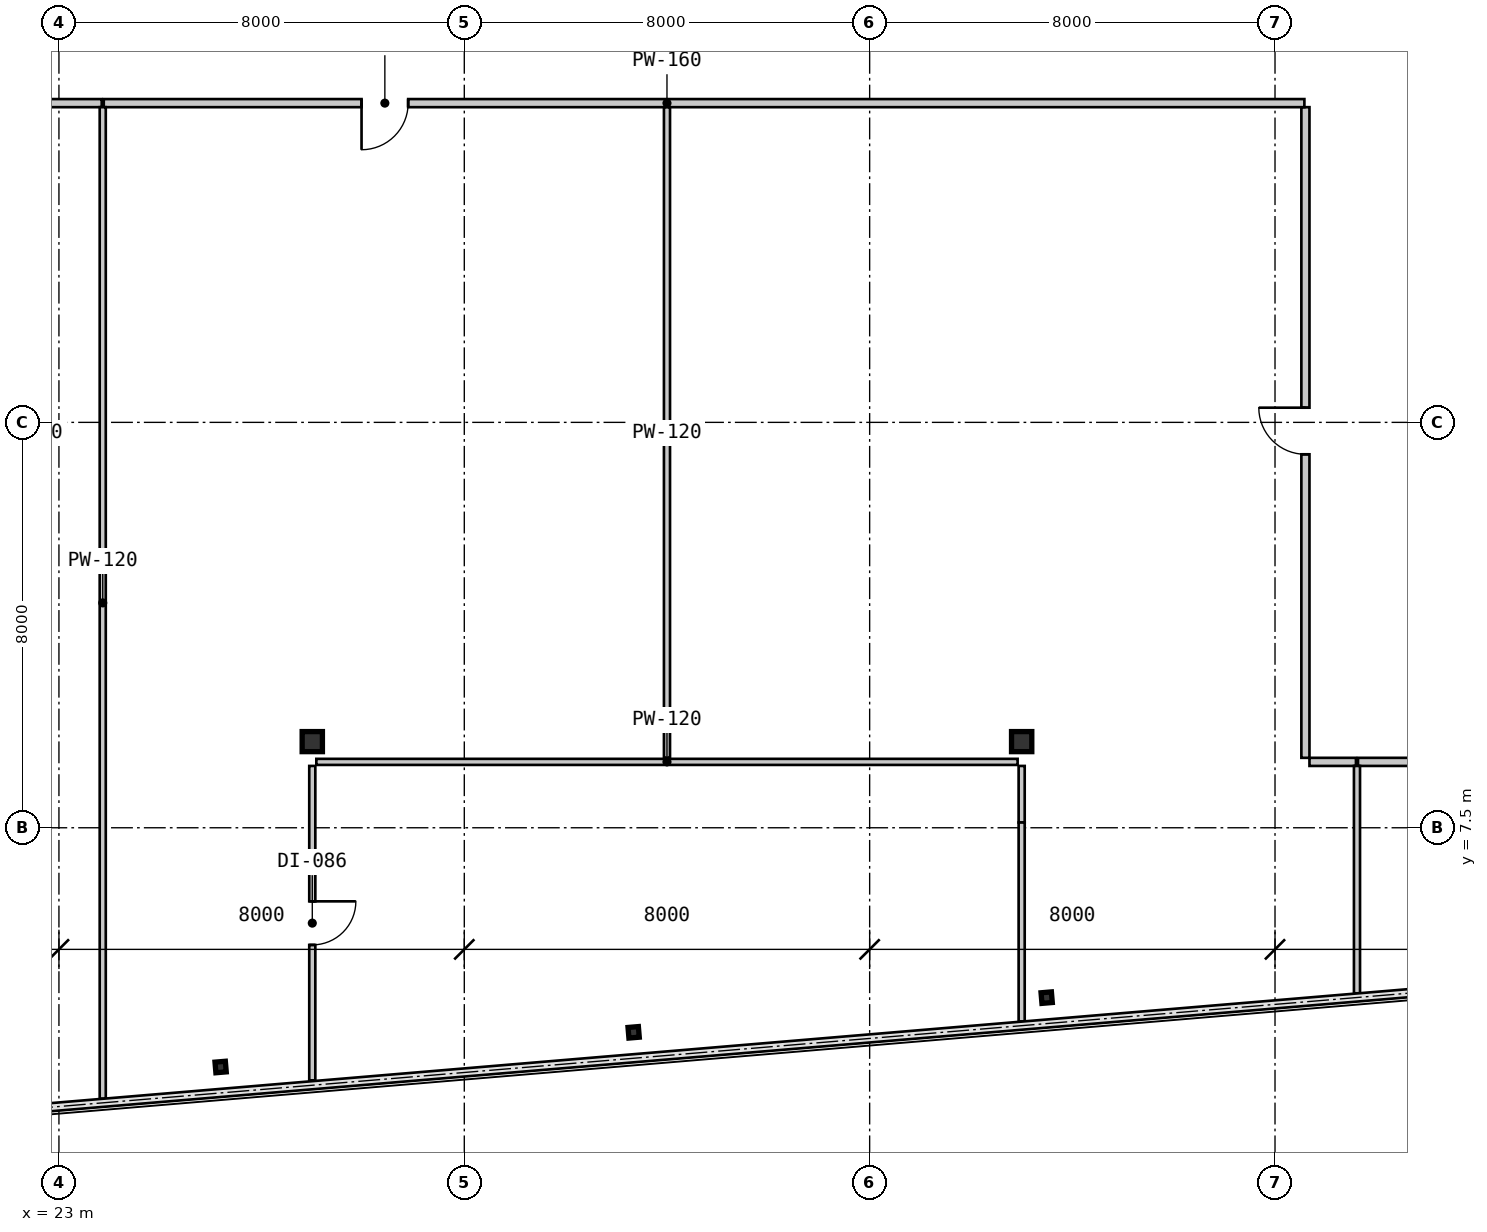
"""IFC4 building model, lengths in metres.
Left out: names, types, materials, properties, quantities, classifications, styles, units other than length and angle.
Written with IfcOpenShell. Run it as: python <this file> out.ifc"""

import sys

from ifc_helpers import new_model, si_unit, direction, frame, frame_2d, origin, origin_2d, place, context, subcontext, project, spatial, rectangle, i_section, extrude, source, transform, mapped, element, fill, save


model = new_model("IFC4")
c1 = context("Model", 3, precision=1e-05, world=origin(), true_north=direction((0.0, 1.0)))
c2 = subcontext(c1, "Body", "Model", "MODEL_VIEW")
j1 = project(units=[si_unit("LENGTHUNIT", "METRE"), si_unit("PLANEANGLEUNIT", "RADIAN")], contexts=[c1])
p1 = place(None, origin())
s1 = spatial("IfcSite", under=j1, at=p1, CompositionType="ELEMENT")
p2 = place(p1, origin())
s2 = spatial("IfcBuilding", under=s1, at=p2, CompositionType="ELEMENT")
p3 = place(p2, frame((0.0, 0.0, 197.75)))
s3 = spatial("IfcBuildingStorey", under=s2, at=p3, CompositionType="ELEMENT", Elevation=197.75)
m1 = source(origin(), c2, "Body", "SweptSolid", [
    extrude(i_section(OverallWidth=0.4, OverallDepth=0.396, WebThickness=0.022, FlangeThickness=0.034, at=origin_2d()), origin(), (0.0, 0.0, 1.0), 3.15),
])
for number, where, z_axis, x_axis in (
    (1, (28.0, 9.2, 0.0), (0.0, 0.0, 1.0), (1.0, 0.0, 0.0)),
    (2, (42.0, 9.2, 0.0), (0.0, 0.0, 1.0), (1.0, 0.0, 0.0)),
):
    element("IfcColumn", number, at=place(p3, frame(where, z_axis=z_axis, x_axis=x_axis)), inside=s3, PredefinedType="COLUMN", context=c2, shape_type="MappedRepresentation", body=[
        mapped(m1, transform((0.0, 0.0, 0.0), scale=1.0)),
    ])
m2 = source(origin(), c2, "Body", "SweptSolid", [
    extrude(i_section(OverallWidth=0.205, OverallDepth=0.21, WebThickness=0.009, FlangeThickness=0.014, at=origin_2d()), origin(), (0.0, 0.0, 1.0), 3.15),
])
for number, where, z_axis, x_axis in (
    (3, (26.191, 2.779, 0.0), (0.0, 0.0, 1.0), (0.996, 0.084, 0.0)),
    (4, (34.342, 3.463, 0.0), (0.0, 0.0, 1.0), (0.996, 0.084, 0.0)),
    (5, (42.494, 4.147, 0.0), (0.0, 0.0, 1.0), (0.996, 0.084, 0.0)),
):
    element("IfcColumn", number, at=place(p3, frame(where, z_axis=z_axis, x_axis=x_axis)), inside=s3, PredefinedType="COLUMN", context=c2, shape_type="MappedRepresentation", body=[
        mapped(m2, transform((0.0, 0.0, 0.0), scale=1.0)),
    ])
m3 = source(origin(), c2, "Body", "SweptSolid", [
    extrude(rectangle(XDim=1.424, YDim=0.16, at=frame_2d((0.712, 0.0))), origin(), (0.0, 0.0, 1.0), 2.93),
])
p4 = place(p3, frame((23.844, 21.8, 0.0), z_axis=(0.0, 0.0, 1.0), x_axis=(-1.0, 0.0, 0.0)))
e6 = element("IfcWall", 6, at=p4, inside=s3, PredefinedType="PARTITIONING", context=c2, shape_type="MappedRepresentation", body=[
    mapped(m3, transform((0.0, 0.0, 0.0), scale=1.0)),
])
m4 = source(origin(), c2, "Body", "SweptSolid", [
    extrude(rectangle(XDim=11.095, YDim=0.16, at=frame_2d((5.547, 0.0))), origin(), (0.0, 0.0, 1.0), 2.93),
])
p5 = place(p3, frame((34.98, 21.8, 0.0), z_axis=(0.0, 0.0, 1.0), x_axis=(-1.0, 0.0, 0.0)))
e7 = element("IfcWall", 7, at=p5, inside=s3, PredefinedType="PARTITIONING", context=c2, shape_type="MappedRepresentation", body=[
    mapped(m4, transform((0.0, 0.0, 0.0), scale=1.0)),
])
m5 = source(origin(), c2, "Body", "SweptSolid", [
    extrude(rectangle(XDim=0.92, YDim=2.1, at=frame_2d((0.46, 1.05))), frame((0.0, 0.09, 0.0), z_axis=(0.0, -1.0, 0.0), x_axis=(1.0, 0.0, 0.0)), (0.0, 0.0, 1.0), 0.18),
])
p6 = place(p5, frame((5.087, 0.0, 0.0)))
e8 = element("IfcOpeningElement", 8, at=p6, cuts=e7, PredefinedType="OPENING", context=c2, shape_type="MappedRepresentation", body=[
    mapped(m5, transform((0.0, 0.0, 0.0), scale=1.0)),
])
m6 = source(origin(), c2, "Body", "SweptSolid", [
    extrude(rectangle(XDim=12.84, YDim=0.16, at=frame_2d((6.42, 0.0))), origin(), (0.0, 0.0, 1.0), 2.93),
])
p7 = place(p3, frame((47.6, 8.88, 0.0), z_axis=(0.0, 0.0, 1.0), x_axis=(0.0, 1.0, 0.0)))
e9 = element("IfcWall", 9, at=p7, inside=s3, PredefinedType="PARTITIONING", context=c2, shape_type="MappedRepresentation", body=[
    mapped(m6, transform((0.0, 0.0, 0.0), scale=1.0)),
])
p8 = place(p7, frame((5.99, 0.0, 0.0)))
e10 = element("IfcOpeningElement", 10, at=p8, cuts=e9, PredefinedType="OPENING", context=c2, shape_type="MappedRepresentation", body=[
    mapped(m5, transform((0.0, 0.0, 0.0), scale=1.0)),
])
m7 = source(origin(), c2, "Body", "SweptSolid", [
    extrude(rectangle(XDim=12.559, YDim=0.16, at=frame_2d((6.28, 0.0))), origin(), (0.0, 0.0, 1.0), 2.93),
])
p9 = place(p3, frame((47.58, 21.8, 0.0), z_axis=(0.0, 0.0, 1.0), x_axis=(-1.0, 0.0, 0.0)))
e11 = element("IfcWall", 11, at=p9, inside=s3, PredefinedType="PARTITIONING", context=c2, shape_type="MappedRepresentation", body=[
    mapped(m7, transform((0.0, 0.0, 0.0), scale=1.0)),
])
m8 = source(origin(), c2, "Body", "SweptSolid", [
    extrude(rectangle(XDim=0.917, YDim=0.16, at=frame_2d((0.459, 0.0))), origin(), (0.0, 0.0, 1.0), 2.93),
])
p10 = place(p3, frame((48.597, 8.8, 0.0), z_axis=(0.0, 0.0, 1.0), x_axis=(-1.0, 0.0, 0.0)))
e12 = element("IfcWall", 12, at=p10, inside=s3, PredefinedType="PARTITIONING", context=c2, shape_type="MappedRepresentation", body=[
    mapped(m8, transform((0.0, 0.0, 0.0), scale=1.0)),
])
m9 = source(origin(), c2, "Body", "SweptSolid", [
    extrude(rectangle(XDim=1.082, YDim=0.16, at=frame_2d((0.541, 0.0))), origin(), (0.0, 0.0, 1.0), 2.93),
])
p11 = place(p3, frame((49.72, 8.8, 0.0), z_axis=(0.0, 0.0, 1.0), x_axis=(-1.0, 0.0, 0.0)))
e13 = element("IfcWall", 13, at=p11, inside=s3, PredefinedType="PARTITIONING", context=c2, shape_type="MappedRepresentation", body=[
    mapped(m9, transform((0.0, 0.0, 0.0), scale=1.0)),
])
m10 = source(origin(), c2, "Body", "SweptSolid", [
    extrude(rectangle(XDim=6.9, YDim=0.12, at=frame_2d((3.45, 0.0))), origin(), (0.0, 0.0, 1.0), 2.93),
])
p12 = place(p3, frame((28.08, 8.8, 0.0), z_axis=(0.0, 0.0, 1.0), x_axis=(1.0, 0.0, 0.0)))
e14 = element("IfcWall", 14, at=p12, inside=s3, PredefinedType="PARTITIONING", context=c2, shape_type="MappedRepresentation", body=[
    mapped(m10, transform((0.0, 0.0, 0.0), scale=1.0)),
])
m11 = source(origin(), c2, "Body", "SweptSolid", [
    extrude(rectangle(XDim=6.204, YDim=0.12, at=frame_2d((3.102, 0.0))), origin(), (0.0, 0.0, 1.0), 2.93),
])
p13 = place(p3, frame((28.0, 2.516, 0.0), z_axis=(0.0, 0.0, 1.0), x_axis=(0.0, 1.0, 0.0)))
e15 = element("IfcWall", 15, at=p13, inside=s3, PredefinedType="PARTITIONING", context=c2, shape_type="MappedRepresentation", body=[
    mapped(m11, transform((0.0, 0.0, 0.0), scale=1.0)),
])
m12 = source(origin(), c2, "Body", "SweptSolid", [
    extrude(rectangle(XDim=0.86, YDim=2.1, at=frame_2d((0.43, 1.05))), frame((0.0, 0.07, 0.0), z_axis=(0.0, -1.0, 0.0), x_axis=(1.0, 0.0, 0.0)), (0.0, 0.0, 1.0), 0.14),
])
p14 = place(p13, frame((2.672, 0.0, 0.0)))
e16 = element("IfcOpeningElement", 16, at=p14, cuts=e15, PredefinedType="OPENING", context=c2, shape_type="MappedRepresentation", body=[
    mapped(m12, transform((0.0, 0.0, 0.0), scale=1.0)),
])
p15 = place(p3, frame((35.02, 8.8, 0.0), z_axis=(0.0, 0.0, 1.0), x_axis=(1.0, 0.0, 0.0)))
e17 = element("IfcWall", 17, at=p15, inside=s3, PredefinedType="PARTITIONING", context=c2, shape_type="MappedRepresentation", body=[
    mapped(m10, transform((0.0, 0.0, 0.0), scale=1.0)),
])
m13 = source(origin(), c2, "Body", "SweptSolid", [
    extrude(rectangle(XDim=1.116, YDim=0.12, at=frame_2d((0.558, 0.0))), origin(), (0.0, 0.0, 1.0), 2.47),
])
p16 = place(p3, frame((42.0, 8.72, 0.0), z_axis=(0.0, 0.0, 1.0), x_axis=(0.0, -1.0, 0.0)))
e18 = element("IfcWall", 18, at=p16, inside=s3, PredefinedType="PARTITIONING", context=c2, shape_type="MappedRepresentation", body=[
    mapped(m13, transform((0.0, 0.0, 0.0), scale=1.0)),
])
m14 = source(origin(), c2, "Body", "SweptSolid", [
    extrude(rectangle(XDim=3.926, YDim=0.12, at=frame_2d((1.963, 0.0))), origin(), (0.0, 0.0, 1.0), 2.93),
])
p17 = place(p3, frame((42.0, 7.604, 0.0), z_axis=(0.0, 0.0, 1.0), x_axis=(0.0, -1.0, 0.0)))
e19 = element("IfcWall", 19, at=p17, inside=s3, PredefinedType="PARTITIONING", context=c2, shape_type="MappedRepresentation", body=[
    mapped(m14, transform((0.0, 0.0, 0.0), scale=1.0)),
])
m15 = source(origin(), c2, "Body", "SweptSolid", [
    extrude(rectangle(XDim=19.565, YDim=0.12, at=frame_2d((9.782, 0.0))), origin(), (0.0, 0.0, 1.0), 2.93),
])
p18 = place(p3, frame((23.865, 21.72, 0.0), z_axis=(0.0, 0.0, 1.0), x_axis=(0.0, -1.0, 0.0)))
e20 = element("IfcWall", 20, at=p18, inside=s3, PredefinedType="PARTITIONING", context=c2, shape_type="MappedRepresentation", body=[
    mapped(m15, transform((0.0, 0.0, 0.0), scale=1.0)),
])
m16 = source(origin(), c2, "Body", "SweptSolid", [
    extrude(rectangle(XDim=12.836, YDim=0.12, at=frame_2d((6.418, 0.0))), origin(), (0.0, 0.0, 1.0), 2.93),
])
p19 = place(p3, frame((35.0, 21.718, 0.0), z_axis=(0.0, 0.0, 1.0), x_axis=(0.0, -1.0, 0.0)))
e21 = element("IfcWall", 21, at=p19, inside=s3, PredefinedType="PARTITIONING", context=c2, shape_type="MappedRepresentation", body=[
    mapped(m16, transform((0.0, 0.0, 0.0), scale=1.0)),
])
m17 = source(origin(), c2, "Body", "SweptSolid", [
    extrude(rectangle(XDim=4.487, YDim=0.12, at=frame_2d((2.243, 0.0))), origin(), (0.0, 0.0, 1.0), 2.93),
])
p20 = place(p3, frame((48.618, 8.72, 0.0), z_axis=(0.0, 0.0, 1.0), x_axis=(0.0, -1.0, 0.0)))
e22 = element("IfcWall", 22, at=p20, inside=s3, PredefinedType="PARTITIONING", context=c2, shape_type="MappedRepresentation", body=[
    mapped(m17, transform((0.0, 0.0, 0.0), scale=1.0)),
])
m18 = source(origin(), c2, "Body", "SweptSolid", [
    extrude(rectangle(XDim=0.92, YDim=2.1, at=frame_2d((0.46, 1.05))), frame((0.0, 0.025, 0.0), z_axis=(0.0, -1.0, 0.0), x_axis=(1.0, 0.0, 0.0)), (0.0, 0.0, 1.0), 0.05),
])
p21 = place(p6, origin())
e23 = element("IfcDoor", 23, at=p21, inside=s3, OperationType="SINGLE_SWING_RIGHT", PredefinedType="DOOR", context=c2, shape_type="MappedRepresentation", body=[
    mapped(m18, transform((0.0, 0.0, 0.0), scale=1.0)),
])
fill(e8, e23)
p22 = place(p8, origin())
e24 = element("IfcDoor", 24, at=p22, inside=s3, OperationType="SINGLE_SWING_RIGHT", PredefinedType="DOOR", context=c2, shape_type="MappedRepresentation", body=[
    mapped(m18, transform((0.0, 0.0, 0.0), scale=1.0)),
])
fill(e10, e24)
m19 = source(origin(), c2, "Body", "SweptSolid", [
    extrude(rectangle(XDim=0.86, YDim=2.1, at=frame_2d((0.43, 1.05))), frame((0.0, 0.025, 0.0), z_axis=(0.0, -1.0, 0.0), x_axis=(1.0, 0.0, 0.0)), (0.0, 0.0, 1.0), 0.05),
])
p23 = place(p14, frame((0.86, 0.0, 0.0), z_axis=(0.0, 0.0, 1.0), x_axis=(-1.0, 0.0, 0.0)))
e25 = element("IfcDoor", 25, at=p23, inside=s3, OperationType="SINGLE_SWING_LEFT", PredefinedType="DOOR", context=c2, shape_type="MappedRepresentation", body=[
    mapped(m19, transform((0.0, 0.0, 0.0), scale=1.0)),
])
fill(e16, e25)
save(model, sys.argv[1])
